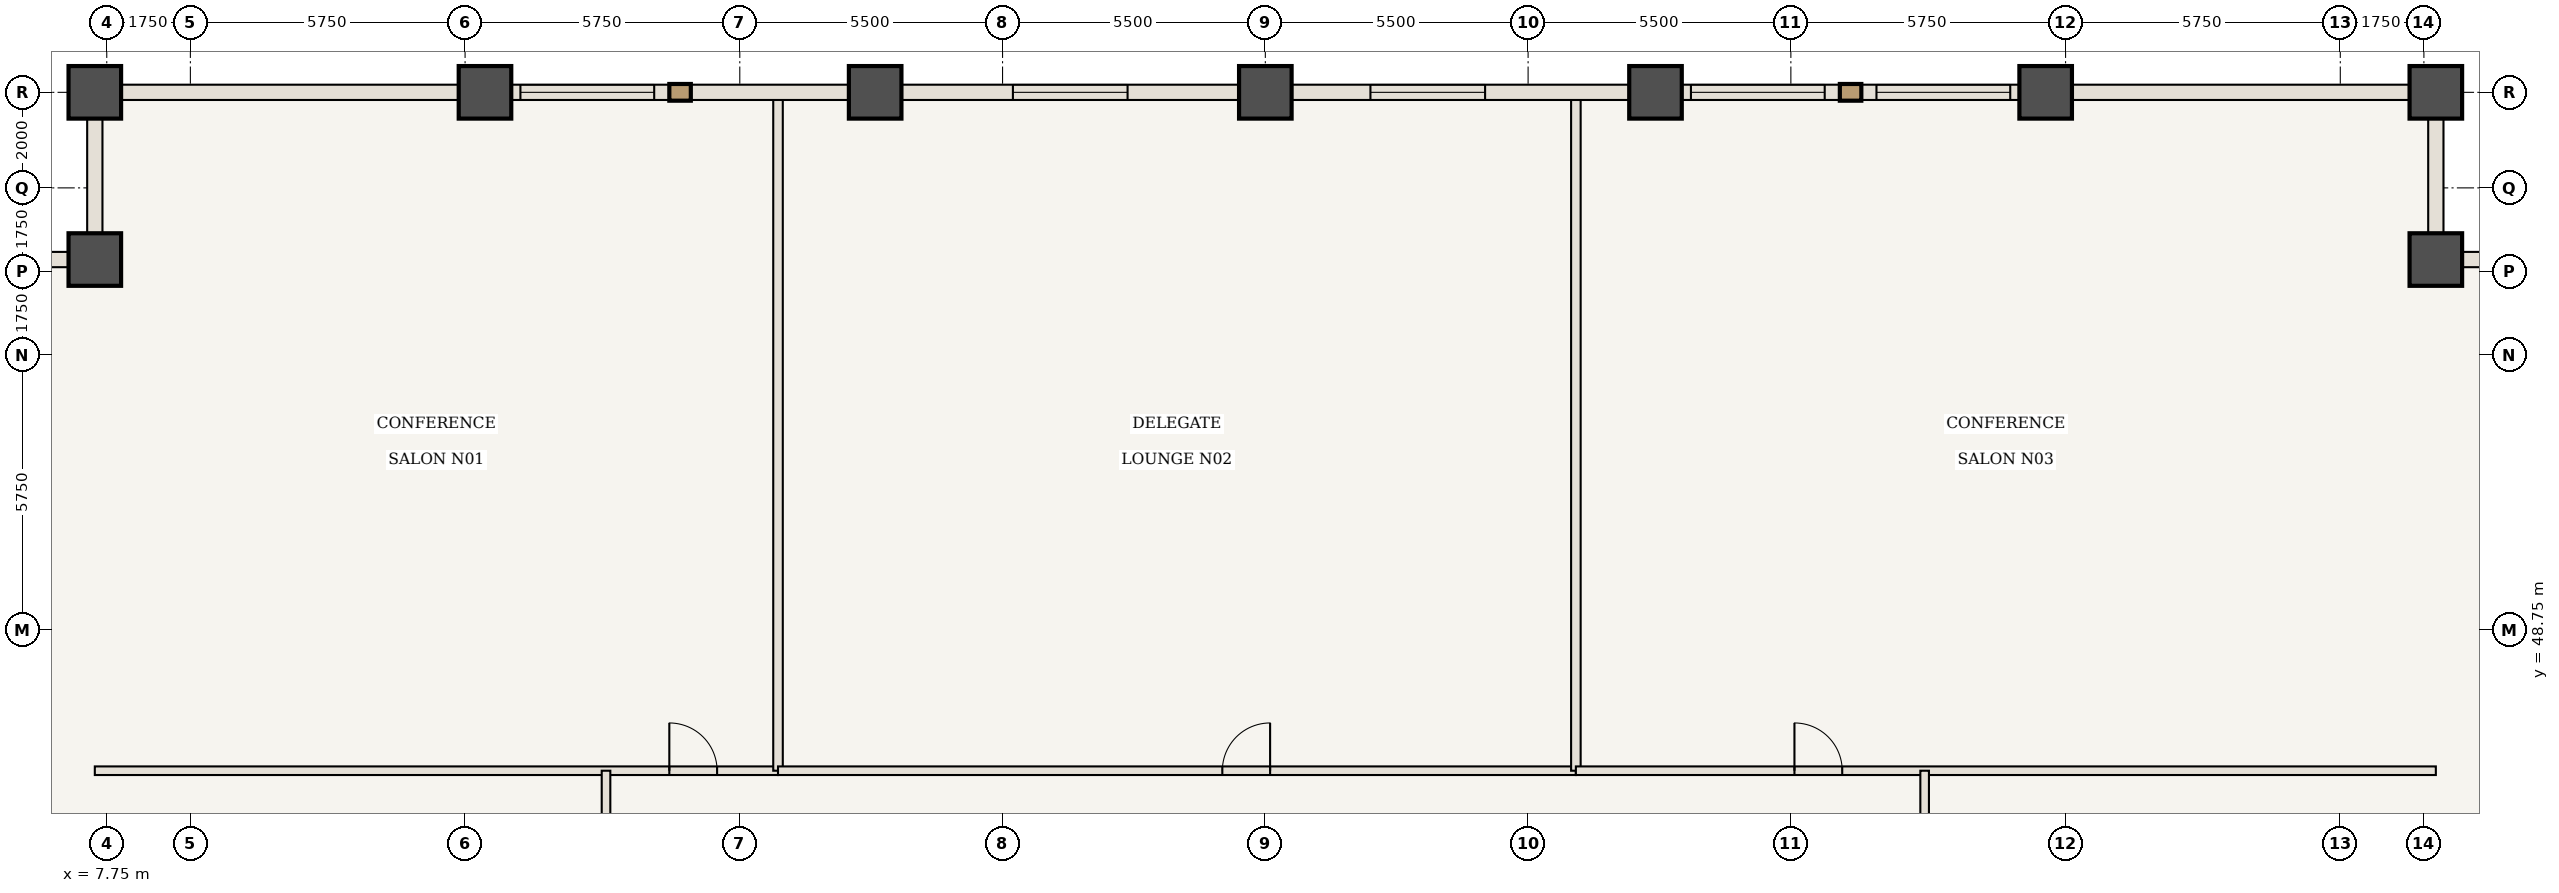
"""IFC4 building model, lengths in metres.
Left out: names, types, materials, properties, quantities, classifications, styles, units other than length and angle.
Written with IfcOpenShell. Run it as: python <this file> out.ifc"""

import sys

from ifc_helpers import new_model, si_unit, direction, frame, frame_2d, origin, origin_2d, place, context, subcontext, project, spatial, rectangle, extrude, element, fill, save


model = new_model("IFC4")
c1 = context("Model", 3, precision=1e-05, world=origin(), true_north=direction((0.0, 1.0)))
c2 = subcontext(c1, "Body", "Model", "MODEL_VIEW")
j1 = project(units=[si_unit("LENGTHUNIT", "METRE"), si_unit("PLANEANGLEUNIT", "RADIAN")], contexts=[c1])
p1 = place(None, origin())
s1 = spatial("IfcSite", under=j1, at=p1, CompositionType="ELEMENT")
p2 = place(p1, origin())
s2 = spatial("IfcBuilding", under=s1, at=p2, CompositionType="ELEMENT")
p3 = place(p2, frame((0.0, 0.0, 92.75)))
s3 = spatial("IfcBuildingStorey", under=s2, at=p3, CompositionType="ELEMENT", Elevation=92.75)
for number, where, z_axis, x_axis in (
    (1, (56.5, 56.5, 0.0), (0.0, 0.0, 1.0), (1.0, 0.0, 0.0)),
    (2, (56.5, 60.0, 0.0), (0.0, 0.0, 1.0), (1.0, 0.0, 0.0)),
    (3, (7.5, 60.0, 0.0), (0.0, 0.0, 1.0), (1.0, 0.0, 0.0)),
    (4, (7.5, 56.5, 0.0), (0.0, 0.0, 1.0), (1.0, 0.0, 0.0)),
    (5, (15.667, 60.0, 0.0), (0.0, 0.0, 1.0), (1.0, 0.0, 0.0)),
    (6, (23.833, 60.0, 0.0), (0.0, 0.0, 1.0), (1.0, 0.0, 0.0)),
    (7, (32.0, 60.0, 0.0), (0.0, 0.0, 1.0), (1.0, 0.0, 0.0)),
    (8, (40.167, 60.0, 0.0), (0.0, 0.0, 1.0), (1.0, 0.0, 0.0)),
    (9, (48.333, 60.0, 0.0), (0.0, 0.0, 1.0), (1.0, 0.0, 0.0)),
):
    element("IfcColumn", number, at=place(p3, frame(where, z_axis=z_axis, x_axis=x_axis)), inside=s3, PredefinedType="COLUMN", context=c2, shape_type="SweptSolid", body=[
        extrude(rectangle(XDim=1.1, YDim=1.1, at=origin_2d()), origin(), (0.0, 0.0, 1.0), 3.5),
    ])
p4 = place(p3, frame((7.5, 45.8, 0.0), z_axis=(0.0, 0.0, 1.0), x_axis=(1.0, 0.0, 0.0)))
e10 = element("IfcWall", 10, at=p4, inside=s3, PredefinedType="STANDARD", context=c2, shape_type="SweptSolid", body=[
    extrude(rectangle(XDim=14.3, YDim=0.18, at=frame_2d((7.15, 0.0))), origin(), (0.0, 0.0, 1.0), 3.28),
])
p5 = place(p4, frame((12.025, 0.0, 0.0)))
e11 = element("IfcOpeningElement", 11, at=p5, cuts=e10, PredefinedType="OPENING", context=c2, shape_type="SweptSolid", body=[
    extrude(rectangle(XDim=1.0, YDim=2.15, at=frame_2d((0.5, 1.075))), frame((0.0, 0.1, 0.0), z_axis=(0.0, -1.0, 0.0), x_axis=(1.0, 0.0, 0.0)), (0.0, 0.0, 1.0), 0.2),
])
p6 = place(p3, frame((21.8, 45.8, 0.0), z_axis=(0.0, 0.0, 1.0), x_axis=(0.0, 1.0, 0.0)))
e12 = element("IfcWall", 12, at=p6, inside=s3, PredefinedType="STANDARD", context=c2, shape_type="SweptSolid", body=[
    extrude(rectangle(XDim=14.14, YDim=0.2, at=frame_2d((7.07, 0.0))), origin(), (0.0, 0.0, 1.0), 3.28),
])
p7 = place(p3, frame((21.8, 45.8, 0.0), z_axis=(0.0, 0.0, 1.0), x_axis=(1.0, 0.0, 0.0)))
e13 = element("IfcWall", 13, at=p7, inside=s3, PredefinedType="STANDARD", context=c2, shape_type="SweptSolid", body=[
    extrude(rectangle(XDim=16.7, YDim=0.18, at=frame_2d((8.35, 0.0))), origin(), (0.0, 0.0, 1.0), 3.28),
])
p8 = place(p7, frame((9.3, 0.0, 0.0)))
e14 = element("IfcOpeningElement", 14, at=p8, cuts=e13, PredefinedType="OPENING", context=c2, shape_type="SweptSolid", body=[
    extrude(rectangle(XDim=1.0, YDim=2.15, at=frame_2d((0.5, 1.075))), frame((0.0, 0.1, 0.0), z_axis=(0.0, -1.0, 0.0), x_axis=(1.0, 0.0, 0.0)), (0.0, 0.0, 1.0), 0.2),
])
p9 = place(p3, frame((38.5, 45.8, 0.0), z_axis=(0.0, 0.0, 1.0), x_axis=(0.0, 1.0, 0.0)))
e15 = element("IfcWall", 15, at=p9, inside=s3, PredefinedType="STANDARD", context=c2, shape_type="SweptSolid", body=[
    extrude(rectangle(XDim=14.14, YDim=0.2, at=frame_2d((7.07, 0.0))), origin(), (0.0, 0.0, 1.0), 3.28),
])
p10 = place(p3, frame((38.5, 45.8, 0.0), z_axis=(0.0, 0.0, 1.0), x_axis=(1.0, 0.0, 0.0)))
e16 = element("IfcWall", 16, at=p10, inside=s3, PredefinedType="STANDARD", context=c2, shape_type="SweptSolid", body=[
    extrude(rectangle(XDim=18.0, YDim=0.18, at=frame_2d((9.0, 0.0))), origin(), (0.0, 0.0, 1.0), 3.28),
])
p11 = place(p10, frame((4.575, 0.0, 0.0)))
e17 = element("IfcOpeningElement", 17, at=p11, cuts=e16, PredefinedType="OPENING", context=c2, shape_type="SweptSolid", body=[
    extrude(rectangle(XDim=1.0, YDim=2.15, at=frame_2d((0.5, 1.075))), frame((0.0, 0.1, 0.0), z_axis=(0.0, -1.0, 0.0), x_axis=(1.0, 0.0, 0.0)), (0.0, 0.0, 1.0), 0.2),
])
p12 = place(p3, frame((18.2, 34.5, 0.0), z_axis=(0.0, 0.0, 1.0), x_axis=(0.0, 1.0, 0.0)))
e18 = element("IfcWall", 18, at=p12, inside=s3, PredefinedType="STANDARD", context=c2, shape_type="SweptSolid", body=[
    extrude(rectangle(XDim=11.3, YDim=0.18, at=frame_2d((5.65, 0.0))), origin(), (0.0, 0.0, 1.0), 3.28),
])
p13 = place(p12, frame((5.15, 0.0, 0.0)))
e19 = element("IfcOpeningElement", 19, at=p13, cuts=e18, PredefinedType="OPENING", context=c2, shape_type="SweptSolid", body=[
    extrude(rectangle(XDim=1.0, YDim=2.15, at=frame_2d((0.5, 1.075))), frame((0.0, 0.1, 0.0), z_axis=(0.0, -1.0, 0.0), x_axis=(1.0, 0.0, 0.0)), (0.0, 0.0, 1.0), 0.2),
])
p14 = place(p3, frame((45.8, 37.5, 0.0), z_axis=(0.0, 0.0, 1.0), x_axis=(0.0, 1.0, 0.0)))
e20 = element("IfcWall", 20, at=p14, inside=s3, PredefinedType="STANDARD", context=c2, shape_type="SweptSolid", body=[
    extrude(rectangle(XDim=8.3, YDim=0.18, at=frame_2d((4.15, 0.0))), origin(), (0.0, 0.0, 1.0), 3.28),
])
p15 = place(p14, frame((3.65, 0.0, 0.0)))
e21 = element("IfcOpeningElement", 21, at=p15, cuts=e20, PredefinedType="OPENING", context=c2, shape_type="SweptSolid", body=[
    extrude(rectangle(XDim=1.0, YDim=2.15, at=frame_2d((0.5, 1.075))), frame((0.0, 0.1, 0.0), z_axis=(0.0, -1.0, 0.0), x_axis=(1.0, 0.0, 0.0)), (0.0, 0.0, 1.0), 0.2),
])
p16 = place(p3, frame((7.5, 60.0, 0.0), z_axis=(0.0, 0.0, 1.0), x_axis=(1.0, 0.0, 0.0)))
e22 = element("IfcWall", 22, at=p16, inside=s3, PredefinedType="USERDEFINED", context=c2, shape_type="SweptSolid", body=[
    extrude(rectangle(XDim=8.167, YDim=0.32, at=frame_2d((4.083, 0.0))), origin(), (0.0, 0.0, 1.0), 2.48),
])
p17 = place(p3, frame((15.667, 60.0, 0.0), z_axis=(0.0, 0.0, 1.0), x_axis=(1.0, 0.0, 0.0)))
e23 = element("IfcWall", 23, at=p17, inside=s3, PredefinedType="USERDEFINED", context=c2, shape_type="SweptSolid", body=[
    extrude(rectangle(XDim=8.167, YDim=0.32, at=frame_2d((4.083, 0.0))), origin(), (0.0, 0.0, 1.0), 2.48),
])
p18 = place(p17, frame((0.742, 0.0, 0.85)))
e24 = element("IfcOpeningElement", 24, at=p18, cuts=e23, PredefinedType="OPENING", context=c2, shape_type="SweptSolid", body=[
    extrude(rectangle(XDim=2.8, YDim=1.43, at=frame_2d((1.4, 0.715))), frame((0.0, 0.17, 0.0), z_axis=(0.0, -1.0, 0.0), x_axis=(1.0, 0.0, 0.0)), (0.0, 0.0, 1.0), 0.34),
])
p19 = place(p3, frame((23.833, 60.0, 0.0), z_axis=(0.0, 0.0, 1.0), x_axis=(1.0, 0.0, 0.0)))
e25 = element("IfcWall", 25, at=p19, inside=s3, PredefinedType="USERDEFINED", context=c2, shape_type="SweptSolid", body=[
    extrude(rectangle(XDim=8.167, YDim=0.32, at=frame_2d((4.083, 0.0))), origin(), (0.0, 0.0, 1.0), 2.48),
])
p20 = place(p19, frame((2.883, 0.0, 0.85)))
e26 = element("IfcOpeningElement", 26, at=p20, cuts=e25, PredefinedType="OPENING", context=c2, shape_type="SweptSolid", body=[
    extrude(rectangle(XDim=2.4, YDim=1.43, at=frame_2d((1.2, 0.715))), frame((0.0, 0.17, 0.0), z_axis=(0.0, -1.0, 0.0), x_axis=(1.0, 0.0, 0.0)), (0.0, 0.0, 1.0), 0.34),
])
p21 = place(p3, frame((32.0, 60.0, 0.0), z_axis=(0.0, 0.0, 1.0), x_axis=(1.0, 0.0, 0.0)))
e27 = element("IfcWall", 27, at=p21, inside=s3, PredefinedType="USERDEFINED", context=c2, shape_type="SweptSolid", body=[
    extrude(rectangle(XDim=8.167, YDim=0.32, at=frame_2d((4.083, 0.0))), origin(), (0.0, 0.0, 1.0), 2.48),
])
p22 = place(p21, frame((2.2, 0.0, 0.85)))
e28 = element("IfcOpeningElement", 28, at=p22, cuts=e27, PredefinedType="OPENING", context=c2, shape_type="SweptSolid", body=[
    extrude(rectangle(XDim=2.4, YDim=1.43, at=frame_2d((1.2, 0.715))), frame((0.0, 0.17, 0.0), z_axis=(0.0, -1.0, 0.0), x_axis=(1.0, 0.0, 0.0)), (0.0, 0.0, 1.0), 0.34),
])
p23 = place(p3, frame((40.167, 60.0, 0.0), z_axis=(0.0, 0.0, 1.0), x_axis=(1.0, 0.0, 0.0)))
e29 = element("IfcWall", 29, at=p23, inside=s3, PredefinedType="USERDEFINED", context=c2, shape_type="SweptSolid", body=[
    extrude(rectangle(XDim=8.167, YDim=0.32, at=frame_2d((4.083, 0.0))), origin(), (0.0, 0.0, 1.0), 2.48),
])
p24 = place(p23, frame((0.742, 0.0, 0.85)))
e30 = element("IfcOpeningElement", 30, at=p24, cuts=e29, PredefinedType="OPENING", context=c2, shape_type="SweptSolid", body=[
    extrude(rectangle(XDim=2.8, YDim=1.43, at=frame_2d((1.4, 0.715))), frame((0.0, 0.17, 0.0), z_axis=(0.0, -1.0, 0.0), x_axis=(1.0, 0.0, 0.0)), (0.0, 0.0, 1.0), 0.34),
])
p25 = place(p23, frame((4.625, 0.0, 0.85)))
e31 = element("IfcOpeningElement", 31, at=p25, cuts=e29, PredefinedType="OPENING", context=c2, shape_type="SweptSolid", body=[
    extrude(rectangle(XDim=2.8, YDim=1.43, at=frame_2d((1.4, 0.715))), frame((0.0, 0.17, 0.0), z_axis=(0.0, -1.0, 0.0), x_axis=(1.0, 0.0, 0.0)), (0.0, 0.0, 1.0), 0.34),
])
p26 = place(p3, frame((48.333, 60.0, 0.0), z_axis=(0.0, 0.0, 1.0), x_axis=(1.0, 0.0, 0.0)))
e32 = element("IfcWall", 32, at=p26, inside=s3, PredefinedType="USERDEFINED", context=c2, shape_type="SweptSolid", body=[
    extrude(rectangle(XDim=8.167, YDim=0.32, at=frame_2d((4.083, 0.0))), origin(), (0.0, 0.0, 1.0), 2.48),
])
for number, where, z_axis, x_axis in (
    (33, (56.5, 56.5, 0.0), (0.0, 0.0, 1.0), (1.0, 0.0, 0.0)),
    (34, (56.5, 60.0, 0.0), (0.0, 0.0, 1.0), (0.0, -1.0, 0.0)),
    (35, (7.5, 56.5, 0.0), (0.0, 0.0, 1.0), (0.0, 1.0, 0.0)),
    (36, (4.0, 56.5, 0.0), (0.0, 0.0, 1.0), (1.0, 0.0, 0.0)),
):
    element("IfcWall", number, at=place(p3, frame(where, z_axis=z_axis, x_axis=x_axis)), inside=s3, PredefinedType="USERDEFINED", context=c2, shape_type="SweptSolid", body=[
        extrude(rectangle(XDim=3.5, YDim=0.32, at=frame_2d((1.75, 0.0))), origin(), (0.0, 0.0, 1.0), 2.48),
    ])
p27 = place(p5, origin())
e37 = element("IfcDoor", 37, at=p27, inside=s3, OperationType="SINGLE_SWING_LEFT", PredefinedType="DOOR", context=c2, shape_type="SweptSolid", body=[
    extrude(rectangle(XDim=1.0, YDim=2.15, at=frame_2d((0.5, 1.075))), frame((0.0, 0.025, 0.0), z_axis=(0.0, -1.0, 0.0), x_axis=(1.0, 0.0, 0.0)), (0.0, 0.0, 1.0), 0.05),
])
fill(e11, e37)
p28 = place(p8, origin())
e38 = element("IfcDoor", 38, at=p28, inside=s3, OperationType="SINGLE_SWING_RIGHT", PredefinedType="DOOR", context=c2, shape_type="SweptSolid", body=[
    extrude(rectangle(XDim=1.0, YDim=2.15, at=frame_2d((0.5, 1.075))), frame((0.0, 0.025, 0.0), z_axis=(0.0, -1.0, 0.0), x_axis=(1.0, 0.0, 0.0)), (0.0, 0.0, 1.0), 0.05),
])
fill(e14, e38)
p29 = place(p11, origin())
e39 = element("IfcDoor", 39, at=p29, inside=s3, OperationType="SINGLE_SWING_LEFT", PredefinedType="DOOR", context=c2, shape_type="SweptSolid", body=[
    extrude(rectangle(XDim=1.0, YDim=2.15, at=frame_2d((0.5, 1.075))), frame((0.0, 0.025, 0.0), z_axis=(0.0, -1.0, 0.0), x_axis=(1.0, 0.0, 0.0)), (0.0, 0.0, 1.0), 0.05),
])
fill(e17, e39)
p30 = place(p18, origin())
e40 = element("IfcWindow", 40, at=p30, inside=s3, PartitioningType="SINGLE_PANEL", PredefinedType="WINDOW", context=c2, shape_type="SweptSolid", body=[
    extrude(rectangle(XDim=2.8, YDim=1.43, at=frame_2d((1.4, 0.715))), frame((0.0, 0.03, 0.0), z_axis=(0.0, -1.0, 0.0), x_axis=(1.0, 0.0, 0.0)), (0.0, 0.0, 1.0), 0.06),
])
fill(e24, e40)
p31 = place(p20, origin())
e41 = element("IfcWindow", 41, at=p31, inside=s3, PartitioningType="SINGLE_PANEL", PredefinedType="WINDOW", context=c2, shape_type="SweptSolid", body=[
    extrude(rectangle(XDim=2.4, YDim=1.43, at=frame_2d((1.2, 0.715))), frame((0.0, 0.03, 0.0), z_axis=(0.0, -1.0, 0.0), x_axis=(1.0, 0.0, 0.0)), (0.0, 0.0, 1.0), 0.06),
])
fill(e26, e41)
p32 = place(p22, origin())
e42 = element("IfcWindow", 42, at=p32, inside=s3, PartitioningType="SINGLE_PANEL", PredefinedType="WINDOW", context=c2, shape_type="SweptSolid", body=[
    extrude(rectangle(XDim=2.4, YDim=1.43, at=frame_2d((1.2, 0.715))), frame((0.0, 0.03, 0.0), z_axis=(0.0, -1.0, 0.0), x_axis=(1.0, 0.0, 0.0)), (0.0, 0.0, 1.0), 0.06),
])
fill(e28, e42)
p33 = place(p24, origin())
e43 = element("IfcWindow", 43, at=p33, inside=s3, PartitioningType="SINGLE_PANEL", PredefinedType="WINDOW", context=c2, shape_type="SweptSolid", body=[
    extrude(rectangle(XDim=2.8, YDim=1.43, at=frame_2d((1.4, 0.715))), frame((0.0, 0.03, 0.0), z_axis=(0.0, -1.0, 0.0), x_axis=(1.0, 0.0, 0.0)), (0.0, 0.0, 1.0), 0.06),
])
fill(e30, e43)
p34 = place(p25, origin())
e44 = element("IfcWindow", 44, at=p34, inside=s3, PartitioningType="SINGLE_PANEL", PredefinedType="WINDOW", context=c2, shape_type="SweptSolid", body=[
    extrude(rectangle(XDim=2.8, YDim=1.43, at=frame_2d((1.4, 0.715))), frame((0.0, 0.03, 0.0), z_axis=(0.0, -1.0, 0.0), x_axis=(1.0, 0.0, 0.0)), (0.0, 0.0, 1.0), 0.06),
])
fill(e31, e44)
save(model, sys.argv[1])
